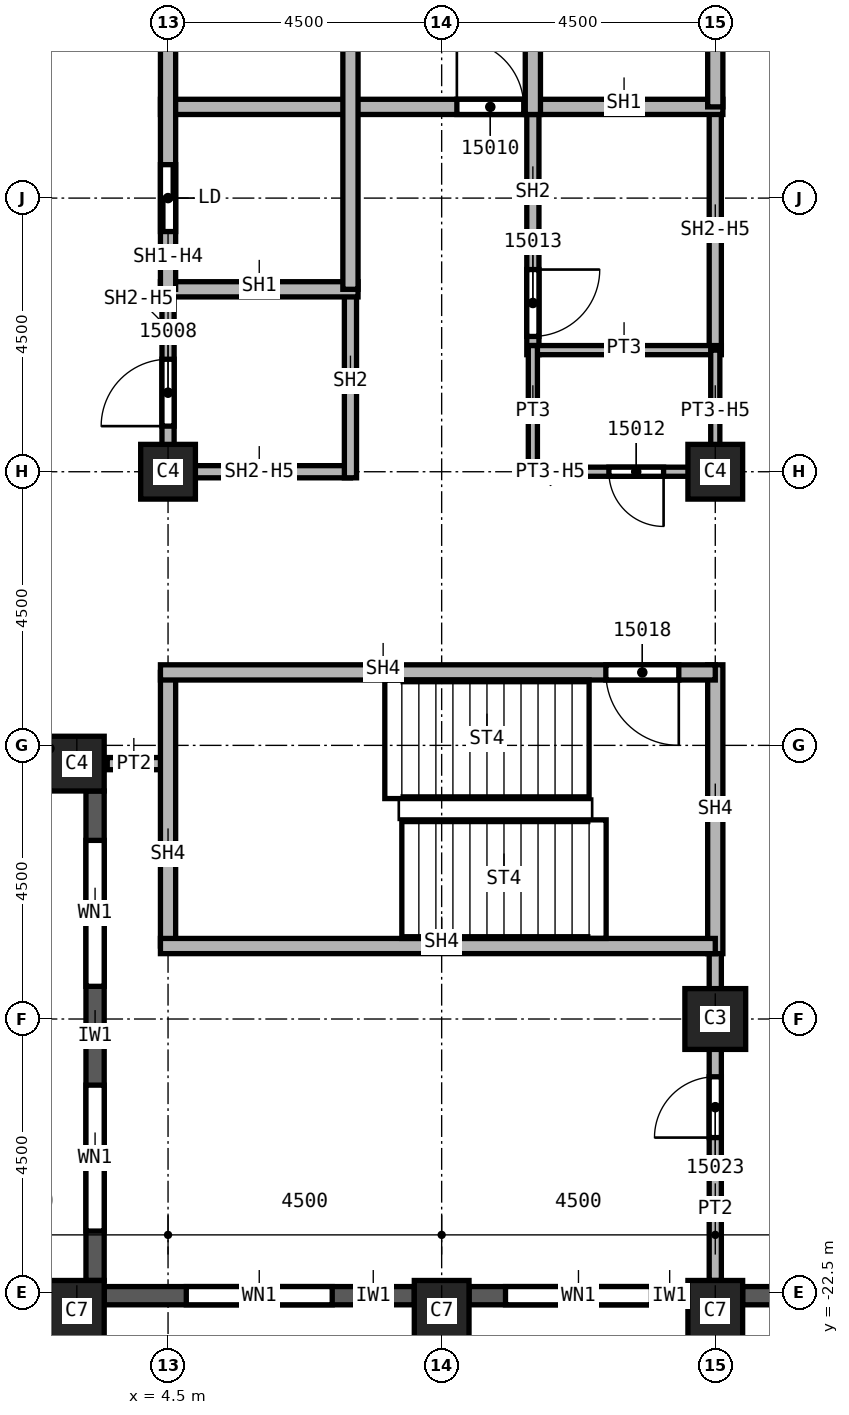
"""IFC4 building model, lengths in metres.
Left out: names, types, materials, properties, quantities, classifications, styles, units other than length and angle.
Written with IfcOpenShell. Run it as: python <this file> out.ifc"""

import sys

from ifc_helpers import new_model, si_unit, direction, frame, frame_2d, origin, origin_2d, place, context, subcontext, project, spatial, rectangle, extrude, element, fill, save


model = new_model("IFC4")
c1 = context("Model", 3, precision=1e-05, world=origin(), true_north=direction((0.0, 1.0)))
c2 = subcontext(c1, "Body", "Model", "MODEL_VIEW")
j1 = project(units=[si_unit("LENGTHUNIT", "METRE"), si_unit("PLANEANGLEUNIT", "RADIAN")], contexts=[c1])
p1 = place(None, origin())
s1 = spatial("IfcSite", under=j1, at=p1, CompositionType="ELEMENT")
p2 = place(p1, origin())
s2 = spatial("IfcBuilding", under=s1, at=p2, CompositionType="ELEMENT")
p3 = place(p2, frame((0.0, 0.0, 232.0)))
s3 = spatial("IfcBuildingStorey", under=s2, at=p3, CompositionType="ELEMENT", Elevation=232.0)
p4 = place(p3, frame((13.5, -18.0, 0.0), z_axis=(0.0, 0.0, 1.0), x_axis=(1.0, 0.0, 0.0)))
e1 = element("IfcColumn", 1, at=p4, inside=s3, PredefinedType="COLUMN", context=c2, shape_type="SweptSolid", body=[
    extrude(rectangle(XDim=1.0, YDim=1.0, at=origin_2d()), origin(), (0.0, 0.0, 1.0), 3.6),
])
for number, where, z_axis, x_axis in (
    (2, (4.5, -9.0, 0.0), (0.0, 0.0, 1.0), (1.0, 0.0, 0.0)),
    (3, (13.5, -9.0, 0.0), (0.0, 0.0, 1.0), (1.0, 0.0, 0.0)),
):
    element("IfcColumn", number, at=place(p3, frame(where, z_axis=z_axis, x_axis=x_axis)), inside=s3, PredefinedType="COLUMN", context=c2, shape_type="SweptSolid", body=[
        extrude(rectangle(XDim=0.9, YDim=0.9, at=origin_2d()), origin(), (0.0, 0.0, 1.0), 3.6),
    ])
for number, where, z_axis, x_axis in (
    (4, (3.0, -22.8, 0.0), (0.0, 0.0, 1.0), (1.0, 0.0, 0.0)),
    (5, (9.0, -22.8, 0.0), (0.0, 0.0, 1.0), (1.0, 0.0, 0.0)),
    (6, (13.5, -22.8, 0.0), (0.0, 0.0, 1.0), (1.0, 0.0, 0.0)),
):
    element("IfcColumn", number, at=place(p3, frame(where, z_axis=z_axis, x_axis=x_axis)), inside=s3, PredefinedType="COLUMN", context=c2, shape_type="SweptSolid", body=[
        extrude(rectangle(XDim=0.9, YDim=1.0, at=origin_2d()), origin(), (0.0, 0.0, 1.0), 3.6),
    ])
p5 = place(p3, frame((3.0, -13.8, 0.0), z_axis=(0.0, 0.0, 1.0), x_axis=(1.0, 0.0, 0.0)))
e7 = element("IfcColumn", 7, at=p5, inside=s3, PredefinedType="COLUMN", context=c2, shape_type="SweptSolid", body=[
    extrude(rectangle(XDim=0.9, YDim=0.9, at=origin_2d()), origin(), (0.0, 0.0, 1.0), 3.6),
])
p6 = place(p3, frame((3.3, -14.25, 0.0), z_axis=(0.0, 0.0, 1.0), x_axis=(0.0, -1.0, 0.0)))
e8 = element("IfcWall", 8, at=p6, inside=s3, PredefinedType="SOLIDWALL", context=c2, shape_type="SweptSolid", body=[
    extrude(rectangle(XDim=8.05, YDim=0.3, at=frame_2d((4.025, 0.0))), origin(), (0.0, 0.0, 1.0), 3.0),
])
p7 = place(p6, frame((0.812, 0.0, 0.8)))
e9 = element("IfcOpeningElement", 9, at=p7, cuts=e8, PredefinedType="OPENING", context=c2, shape_type="SweptSolid", body=[
    extrude(rectangle(XDim=2.4, YDim=1.95, at=frame_2d((1.2, 0.975))), frame((0.0, 0.15, 0.0), z_axis=(0.0, -1.0, 0.0), x_axis=(1.0, 0.0, 0.0)), (0.0, 0.0, 1.0), 0.3),
])
p8 = place(p6, frame((4.837, 0.0, 0.8)))
e10 = element("IfcOpeningElement", 10, at=p8, cuts=e8, PredefinedType="OPENING", context=c2, shape_type="SweptSolid", body=[
    extrude(rectangle(XDim=2.4, YDim=1.95, at=frame_2d((1.2, 0.975))), frame((0.0, 0.15, 0.0), z_axis=(0.0, -1.0, 0.0), x_axis=(1.0, 0.0, 0.0)), (0.0, 0.0, 1.0), 0.3),
])
p9 = place(p3, frame((3.45, -22.55, 0.0), z_axis=(0.0, 0.0, 1.0), x_axis=(1.0, 0.0, 0.0)))
e11 = element("IfcWall", 11, at=p9, inside=s3, PredefinedType="SOLIDWALL", context=c2, shape_type="SweptSolid", body=[
    extrude(rectangle(XDim=5.1, YDim=0.3, at=frame_2d((2.55, 0.0))), origin(), (0.0, 0.0, 1.0), 3.0),
])
p10 = place(p9, frame((1.35, 0.0, 0.8)))
e12 = element("IfcOpeningElement", 12, at=p10, cuts=e11, PredefinedType="OPENING", context=c2, shape_type="SweptSolid", body=[
    extrude(rectangle(XDim=2.4, YDim=1.95, at=frame_2d((1.2, 0.975))), frame((0.0, 0.15, 0.0), z_axis=(0.0, -1.0, 0.0), x_axis=(1.0, 0.0, 0.0)), (0.0, 0.0, 1.0), 0.3),
])
p11 = place(p3, frame((9.45, -22.55, 0.0), z_axis=(0.0, 0.0, 1.0), x_axis=(1.0, 0.0, 0.0)))
e13 = element("IfcWall", 13, at=p11, inside=s3, PredefinedType="SOLIDWALL", context=c2, shape_type="SweptSolid", body=[
    extrude(rectangle(XDim=3.6, YDim=0.3, at=frame_2d((1.8, 0.0))), origin(), (0.0, 0.0, 1.0), 3.0),
])
p12 = place(p11, frame((0.6, 0.0, 0.8)))
e14 = element("IfcOpeningElement", 14, at=p12, cuts=e13, PredefinedType="OPENING", context=c2, shape_type="SweptSolid", body=[
    extrude(rectangle(XDim=2.4, YDim=1.95, at=frame_2d((1.2, 0.975))), frame((0.0, 0.15, 0.0), z_axis=(0.0, -1.0, 0.0), x_axis=(1.0, 0.0, 0.0)), (0.0, 0.0, 1.0), 0.3),
])
p13 = place(p3, frame((13.95, -22.55, 0.0), z_axis=(0.0, 0.0, 1.0), x_axis=(1.0, 0.0, 0.0)))
e15 = element("IfcWall", 15, at=p13, inside=s3, PredefinedType="SOLIDWALL", context=c2, shape_type="SweptSolid", body=[
    extrude(rectangle(XDim=3.6, YDim=0.3, at=frame_2d((1.8, 0.0))), origin(), (0.0, 0.0, 1.0), 3.0),
])
p14 = place(p13, frame((0.625, 0.0, 0.8)))
e16 = element("IfcOpeningElement", 16, at=p14, cuts=e15, PredefinedType="OPENING", context=c2, shape_type="SweptSolid", body=[
    extrude(rectangle(XDim=0.6, YDim=1.95, at=frame_2d((0.3, 0.975))), frame((0.0, 0.15, 0.0), z_axis=(0.0, -1.0, 0.0), x_axis=(1.0, 0.0, 0.0)), (0.0, 0.0, 1.0), 0.3),
])
p15 = place(p13, frame((1.825, 0.0, 0.8)))
e17 = element("IfcOpeningElement", 17, at=p15, cuts=e15, PredefinedType="OPENING", context=c2, shape_type="SweptSolid", body=[
    extrude(rectangle(XDim=1.0, YDim=1.95, at=frame_2d((0.5, 0.975))), frame((0.0, 0.15, 0.0), z_axis=(0.0, -1.0, 0.0), x_axis=(1.0, 0.0, 0.0)), (0.0, 0.0, 1.0), 0.3),
])
p16 = place(p3, frame((4.5, -13.8, 0.0), z_axis=(0.0, 0.0, 1.0), x_axis=(-1.0, 0.0, 0.0)))
e18 = element("IfcWall", 18, at=p16, inside=s3, PredefinedType="PARTITIONING", context=c2, shape_type="SweptSolid", body=[
    extrude(rectangle(XDim=1.0, YDim=0.2, at=frame_2d((0.5, 0.0))), origin(), (0.0, 0.0, 1.0), 3.6),
])
p17 = place(p3, frame((13.5, -22.3, 0.0), z_axis=(0.0, 0.0, 1.0), x_axis=(0.0, 1.0, 0.0)))
e19 = element("IfcWall", 19, at=p17, inside=s3, PredefinedType="PARTITIONING", context=c2, shape_type="SweptSolid", body=[
    extrude(rectangle(XDim=5.625, YDim=0.2, at=frame_2d((2.812, 0.0))), origin(), (0.0, 0.0, 1.0), 3.6),
])
p18 = place(p17, frame((2.35, 0.0, 0.0)))
e20 = element("IfcOpeningElement", 20, at=p18, cuts=e19, PredefinedType="OPENING", context=c2, shape_type="SweptSolid", body=[
    extrude(rectangle(XDim=1.0, YDim=2.1, at=frame_2d((0.5, 1.05))), frame((0.0, 0.1, 0.0), z_axis=(0.0, -1.0, 0.0), x_axis=(1.0, 0.0, 0.0)), (0.0, 0.0, 1.0), 0.2),
])
p19 = place(p3, frame((4.5, -9.1, 0.0), z_axis=(0.0, 0.0, 1.0), x_axis=(0.0, 1.0, 0.0)))
e21 = element("IfcWall", 21, at=p19, inside=s3, PredefinedType="SOLIDWALL", context=c2, shape_type="SweptSolid", body=[
    extrude(rectangle(XDim=3.1, YDim=0.2, at=frame_2d((1.55, 0.0))), origin(), (0.0, 0.0, 1.0), 2.838),
])
p20 = place(p19, frame((0.85, 0.0, 0.0)))
e22 = element("IfcOpeningElement", 22, at=p20, cuts=e21, PredefinedType="OPENING", context=c2, shape_type="SweptSolid", body=[
    extrude(rectangle(XDim=1.1, YDim=2.1, at=frame_2d((0.55, 1.05))), frame((0.0, 0.1, 0.0), z_axis=(0.0, -1.0, 0.0), x_axis=(1.0, 0.0, 0.0)), (0.0, 0.0, 1.0), 0.2),
])
p21 = place(p3, frame((7.5, -9.0, 0.0), z_axis=(0.0, 0.0, 1.0), x_axis=(-1.0, 0.0, 0.0)))
e23 = element("IfcWall", 23, at=p21, inside=s3, PredefinedType="SOLIDWALL", context=c2, shape_type="SweptSolid", body=[
    extrude(rectangle(XDim=3.0, YDim=0.2, at=frame_2d((1.5, 0.0))), origin(), (0.0, 0.0, 1.0), 2.838),
])
p22 = place(p3, frame((7.5, -6.0, 0.0), z_axis=(0.0, 0.0, 1.0), x_axis=(0.0, -1.0, 0.0)))
e24 = element("IfcWall", 24, at=p22, inside=s3, PredefinedType="SOLIDWALL", context=c2, shape_type="SweptSolid", body=[
    extrude(rectangle(XDim=3.1, YDim=0.2, at=frame_2d((1.55, 0.0))), origin(), (0.0, 0.0, 1.0), 3.6),
])
p23 = place(p3, frame((10.5, -2.875, 0.0), z_axis=(0.0, 0.0, 1.0), x_axis=(0.0, -1.0, 0.0)))
e25 = element("IfcWall", 25, at=p23, inside=s3, PredefinedType="SOLIDWALL", context=c2, shape_type="SweptSolid", body=[
    extrude(rectangle(XDim=4.2, YDim=0.2, at=frame_2d((2.1, 0.0))), origin(), (0.0, 0.0, 1.0), 3.6),
])
p24 = place(p23, frame((2.8, 0.0, 0.0)))
e26 = element("IfcOpeningElement", 26, at=p24, cuts=e25, PredefinedType="OPENING", context=c2, shape_type="SweptSolid", body=[
    extrude(rectangle(XDim=1.1, YDim=2.1, at=frame_2d((0.55, 1.05))), frame((0.0, 0.1, 0.0), z_axis=(0.0, -1.0, 0.0), x_axis=(1.0, 0.0, 0.0)), (0.0, 0.0, 1.0), 0.2),
])
p25 = place(p3, frame((13.5, -3.0, 0.0), z_axis=(0.0, 0.0, 1.0), x_axis=(0.0, -1.0, 0.0)))
e27 = element("IfcWall", 27, at=p25, inside=s3, PredefinedType="SOLIDWALL", context=c2, shape_type="SweptSolid", body=[
    extrude(rectangle(XDim=4.0, YDim=0.2, at=frame_2d((2.0, 0.0))), origin(), (0.0, 0.0, 1.0), 2.838),
])
p26 = place(p3, frame((4.375, -6.0, 0.0), z_axis=(0.0, 0.0, 1.0), x_axis=(1.0, 0.0, 0.0)))
e28 = element("IfcWall", 28, at=p26, inside=s3, PredefinedType="SOLIDWALL", context=c2, shape_type="SweptSolid", body=[
    extrude(rectangle(XDim=3.25, YDim=0.25, at=frame_2d((1.625, 0.0))), origin(), (0.0, 0.0, 1.0), 3.6),
])
p27 = place(p3, frame((4.375, -3.0, 0.0), z_axis=(0.0, 0.0, 1.0), x_axis=(1.0, 0.0, 0.0)))
e29 = element("IfcWall", 29, at=p27, inside=s3, PredefinedType="SOLIDWALL", context=c2, shape_type="SweptSolid", body=[
    extrude(rectangle(XDim=9.25, YDim=0.25, at=frame_2d((4.625, 0.0))), origin(), (0.0, 0.0, 1.0), 3.6),
])
p28 = place(p27, frame((4.875, 0.0, 0.0)))
e30 = element("IfcOpeningElement", 30, at=p28, cuts=e29, PredefinedType="OPENING", context=c2, shape_type="SweptSolid", body=[
    extrude(rectangle(XDim=1.1, YDim=2.1, at=frame_2d((0.55, 1.05))), frame((0.0, 0.125, 0.0), z_axis=(0.0, -1.0, 0.0), x_axis=(1.0, 0.0, 0.0)), (0.0, 0.0, 1.0), 0.25),
])
p29 = place(p3, frame((4.5, -6.0, 0.0), z_axis=(0.0, 0.0, 1.0), x_axis=(0.0, 1.0, 0.0)))
e31 = element("IfcWall", 31, at=p29, inside=s3, PredefinedType="SOLIDWALL", context=c2, shape_type="SweptSolid", body=[
    extrude(rectangle(XDim=6.0, YDim=0.25, at=frame_2d((3.0, 0.0))), origin(), (0.0, 0.0, 1.0), 2.838),
])
p30 = place(p29, frame((0.95, 0.0, 0.0)))
e32 = element("IfcOpeningElement", 32, at=p30, cuts=e31, PredefinedType="OPENING", context=c2, shape_type="SweptSolid", body=[
    extrude(rectangle(XDim=1.1, YDim=2.1, at=frame_2d((0.55, 1.05))), frame((0.0, 0.125, 0.0), z_axis=(0.0, -1.0, 0.0), x_axis=(1.0, 0.0, 0.0)), (0.0, 0.0, 1.0), 0.25),
])
p31 = place(p29, frame((3.95, 0.0, 0.0)))
e33 = element("IfcOpeningElement", 33, at=p31, cuts=e31, PredefinedType="OPENING", context=c2, shape_type="SweptSolid", body=[
    extrude(rectangle(XDim=1.1, YDim=2.1, at=frame_2d((0.55, 1.05))), frame((0.0, 0.125, 0.0), z_axis=(0.0, -1.0, 0.0), x_axis=(1.0, 0.0, 0.0)), (0.0, 0.0, 1.0), 0.25),
])
p32 = place(p3, frame((7.5, 3.125, 0.0), z_axis=(0.0, 0.0, 1.0), x_axis=(0.0, -1.0, 0.0)))
e34 = element("IfcWall", 34, at=p32, inside=s3, PredefinedType="SOLIDWALL", context=c2, shape_type="SweptSolid", body=[
    extrude(rectangle(XDim=9.125, YDim=0.25, at=frame_2d((4.562, 0.0))), origin(), (0.0, 0.0, 1.0), 3.6),
])
p33 = place(p3, frame((10.5, 6.125, 0.0), z_axis=(0.0, 0.0, 1.0), x_axis=(0.0, -1.0, 0.0)))
e35 = element("IfcWall", 35, at=p33, inside=s3, PredefinedType="SOLIDWALL", context=c2, shape_type="SweptSolid", body=[
    extrude(rectangle(XDim=9.25, YDim=0.25, at=frame_2d((4.625, 0.0))), origin(), (0.0, 0.0, 1.0), 3.6),
])
p34 = place(p33, frame((7.075, 0.0, 0.0)))
e36 = element("IfcOpeningElement", 36, at=p34, cuts=e35, PredefinedType="OPENING", context=c2, shape_type="SweptSolid", body=[
    extrude(rectangle(XDim=1.1, YDim=2.1, at=frame_2d((0.55, 1.05))), frame((0.0, 0.125, 0.0), z_axis=(0.0, -1.0, 0.0), x_axis=(1.0, 0.0, 0.0)), (0.0, 0.0, 1.0), 0.25),
])
p35 = place(p33, frame((4.075, 0.0, 0.0)))
e37 = element("IfcOpeningElement", 37, at=p35, cuts=e35, PredefinedType="OPENING", context=c2, shape_type="SweptSolid", body=[
    extrude(rectangle(XDim=1.1, YDim=2.1, at=frame_2d((0.55, 1.05))), frame((0.0, 0.125, 0.0), z_axis=(0.0, -1.0, 0.0), x_axis=(1.0, 0.0, 0.0)), (0.0, 0.0, 1.0), 0.25),
])
p36 = place(p3, frame((13.5, 6.0, 0.0), z_axis=(0.0, 0.0, 1.0), x_axis=(0.0, -1.0, 0.0)))
e38 = element("IfcWall", 38, at=p36, inside=s3, PredefinedType="SOLIDWALL", context=c2, shape_type="SweptSolid", body=[
    extrude(rectangle(XDim=9.0, YDim=0.25, at=frame_2d((4.5, 0.0))), origin(), (0.0, 0.0, 1.0), 2.838),
])
p37 = place(p3, frame((4.5, -16.8, 0.0), z_axis=(0.0, 0.0, 1.0), x_axis=(0.0, 1.0, 0.0)))
e39 = element("IfcWall", 39, at=p37, inside=s3, PredefinedType="SOLIDWALL", context=c2, shape_type="SweptSolid", body=[
    extrude(rectangle(XDim=4.5, YDim=0.25, at=frame_2d((2.25, 0.0))), origin(), (0.0, 0.0, 1.0), 3.6),
])
p38 = place(p3, frame((13.5, -16.925, 0.0), z_axis=(0.0, 0.0, 1.0), x_axis=(0.0, 1.0, 0.0)))
e40 = element("IfcWall", 40, at=p38, inside=s3, PredefinedType="SOLIDWALL", context=c2, shape_type="SweptSolid", body=[
    extrude(rectangle(XDim=4.75, YDim=0.25, at=frame_2d((2.375, 0.0))), origin(), (0.0, 0.0, 1.0), 3.6),
])
p39 = place(p3, frame((13.5, -16.8, 0.0), z_axis=(0.0, 0.0, 1.0), x_axis=(-1.0, 0.0, 0.0)))
e41 = element("IfcWall", 41, at=p39, inside=s3, PredefinedType="SOLIDWALL", context=c2, shape_type="SweptSolid", body=[
    extrude(rectangle(XDim=9.125, YDim=0.25, at=frame_2d((4.562, 0.0))), origin(), (0.0, 0.0, 1.0), 3.6),
])
p40 = place(p3, frame((13.5, -12.3, 0.0), z_axis=(0.0, 0.0, 1.0), x_axis=(-1.0, 0.0, 0.0)))
e42 = element("IfcWall", 42, at=p40, inside=s3, PredefinedType="SOLIDWALL", context=c2, shape_type="SweptSolid", body=[
    extrude(rectangle(XDim=9.125, YDim=0.25, at=frame_2d((4.562, 0.0))), origin(), (0.0, 0.0, 1.0), 3.6),
])
p41 = place(p40, frame((0.6, 0.0, 0.0)))
e43 = element("IfcOpeningElement", 43, at=p41, cuts=e42, PredefinedType="OPENING", context=c2, shape_type="SweptSolid", body=[
    extrude(rectangle(XDim=1.2, YDim=2.1, at=frame_2d((0.6, 1.05))), frame((0.0, 0.125, 0.0), z_axis=(0.0, -1.0, 0.0), x_axis=(1.0, 0.0, 0.0)), (0.0, 0.0, 1.0), 0.25),
])
p42 = place(p3, frame((10.5, -7.0, 0.0), z_axis=(0.0, 0.0, 1.0), x_axis=(1.0, 0.0, 0.0)))
e44 = element("IfcWall", 44, at=p42, inside=s3, PredefinedType="PARTITIONING", context=c2, shape_type="SweptSolid", body=[
    extrude(rectangle(XDim=3.1, YDim=0.15, at=frame_2d((1.55, 0.0))), origin(), (0.0, 0.0, 1.0), 3.6),
])
p43 = place(p3, frame((10.5, -6.925, 0.0), z_axis=(0.0, 0.0, 1.0), x_axis=(0.0, -1.0, 0.0)))
e45 = element("IfcWall", 45, at=p43, inside=s3, PredefinedType="PARTITIONING", context=c2, shape_type="SweptSolid", body=[
    extrude(rectangle(XDim=2.15, YDim=0.15, at=frame_2d((1.075, 0.0))), origin(), (0.0, 0.0, 1.0), 3.6),
])
p44 = place(p3, frame((13.5, -9.0, 0.0), z_axis=(0.0, 0.0, 1.0), x_axis=(-1.0, 0.0, 0.0)))
e46 = element("IfcWall", 46, at=p44, inside=s3, PredefinedType="PARTITIONING", context=c2, shape_type="SweptSolid", body=[
    extrude(rectangle(XDim=3.0, YDim=0.15, at=frame_2d((1.5, 0.0))), origin(), (0.0, 0.0, 1.0), 2.838),
])
p45 = place(p44, frame((0.85, 0.0, 0.0)))
e47 = element("IfcOpeningElement", 47, at=p45, cuts=e46, PredefinedType="OPENING", context=c2, shape_type="SweptSolid", body=[
    extrude(rectangle(XDim=0.9, YDim=2.1, at=frame_2d((0.45, 1.05))), frame((0.0, 0.075, 0.0), z_axis=(0.0, -1.0, 0.0), x_axis=(1.0, 0.0, 0.0)), (0.0, 0.0, 1.0), 0.15),
])
p46 = place(p3, frame((13.5, -7.0, 0.0), z_axis=(0.0, 0.0, 1.0), x_axis=(0.0, -1.0, 0.0)))
e48 = element("IfcWall", 48, at=p46, inside=s3, PredefinedType="PARTITIONING", context=c2, shape_type="SweptSolid", body=[
    extrude(rectangle(XDim=2.075, YDim=0.15, at=frame_2d((1.038, 0.0))), origin(), (0.0, 0.0, 1.0), 2.838),
])
p47 = place(p7, origin())
e49 = element("IfcWindow", 49, at=p47, inside=s3, PartitioningType="SINGLE_PANEL", PredefinedType="WINDOW", context=c2, shape_type="SweptSolid", body=[
    extrude(rectangle(XDim=2.4, YDim=1.95, at=frame_2d((1.2, 0.975))), frame((0.0, 0.03, 0.0), z_axis=(0.0, -1.0, 0.0), x_axis=(1.0, 0.0, 0.0)), (0.0, 0.0, 1.0), 0.06),
])
fill(e9, e49)
p48 = place(p8, origin())
e50 = element("IfcWindow", 50, at=p48, inside=s3, PartitioningType="SINGLE_PANEL", PredefinedType="WINDOW", context=c2, shape_type="SweptSolid", body=[
    extrude(rectangle(XDim=2.4, YDim=1.95, at=frame_2d((1.2, 0.975))), frame((0.0, 0.03, 0.0), z_axis=(0.0, -1.0, 0.0), x_axis=(1.0, 0.0, 0.0)), (0.0, 0.0, 1.0), 0.06),
])
fill(e10, e50)
p49 = place(p10, origin())
e51 = element("IfcWindow", 51, at=p49, inside=s3, PartitioningType="SINGLE_PANEL", PredefinedType="WINDOW", context=c2, shape_type="SweptSolid", body=[
    extrude(rectangle(XDim=2.4, YDim=1.95, at=frame_2d((1.2, 0.975))), frame((0.0, 0.03, 0.0), z_axis=(0.0, -1.0, 0.0), x_axis=(1.0, 0.0, 0.0)), (0.0, 0.0, 1.0), 0.06),
])
fill(e12, e51)
p50 = place(p12, origin())
e52 = element("IfcWindow", 52, at=p50, inside=s3, PartitioningType="SINGLE_PANEL", PredefinedType="WINDOW", context=c2, shape_type="SweptSolid", body=[
    extrude(rectangle(XDim=2.4, YDim=1.95, at=frame_2d((1.2, 0.975))), frame((0.0, 0.03, 0.0), z_axis=(0.0, -1.0, 0.0), x_axis=(1.0, 0.0, 0.0)), (0.0, 0.0, 1.0), 0.06),
])
fill(e14, e52)
p51 = place(p20, origin())
e53 = element("IfcDoor", 53, at=p51, inside=s3, OperationType="SINGLE_SWING_LEFT", PredefinedType="DOOR", context=c2, shape_type="SweptSolid", body=[
    extrude(rectangle(XDim=1.1, YDim=2.1, at=frame_2d((0.55, 1.05))), frame((0.0, 0.025, 0.0), z_axis=(0.0, -1.0, 0.0), x_axis=(1.0, 0.0, 0.0)), (0.0, 0.0, 1.0), 0.05),
])
fill(e22, e53)
p52 = place(p28, origin())
e54 = element("IfcDoor", 54, at=p52, inside=s3, OperationType="SINGLE_SWING_LEFT", PredefinedType="DOOR", context=c2, shape_type="SweptSolid", body=[
    extrude(rectangle(XDim=1.1, YDim=2.1, at=frame_2d((0.55, 1.05))), frame((0.0, 0.025, 0.0), z_axis=(0.0, -1.0, 0.0), x_axis=(1.0, 0.0, 0.0)), (0.0, 0.0, 1.0), 0.05),
])
fill(e30, e54)
p53 = place(p45, origin())
e55 = element("IfcDoor", 55, at=p53, inside=s3, OperationType="SINGLE_SWING_LEFT", PredefinedType="DOOR", context=c2, shape_type="SweptSolid", body=[
    extrude(rectangle(XDim=0.9, YDim=2.1, at=frame_2d((0.45, 1.05))), frame((0.0, 0.025, 0.0), z_axis=(0.0, -1.0, 0.0), x_axis=(1.0, 0.0, 0.0)), (0.0, 0.0, 1.0), 0.05),
])
fill(e47, e55)
p54 = place(p24, origin())
e56 = element("IfcDoor", 56, at=p54, inside=s3, OperationType="SINGLE_SWING_RIGHT", PredefinedType="DOOR", context=c2, shape_type="SweptSolid", body=[
    extrude(rectangle(XDim=1.1, YDim=2.1, at=frame_2d((0.55, 1.05))), frame((0.0, 0.025, 0.0), z_axis=(0.0, -1.0, 0.0), x_axis=(1.0, 0.0, 0.0)), (0.0, 0.0, 1.0), 0.05),
])
fill(e26, e56)
p55 = place(p41, origin())
e57 = element("IfcDoor", 57, at=p55, inside=s3, OperationType="SINGLE_SWING_LEFT", PredefinedType="DOOR", context=c2, shape_type="SweptSolid", body=[
    extrude(rectangle(XDim=1.2, YDim=2.1, at=frame_2d((0.6, 1.05))), frame((0.0, 0.025, 0.0), z_axis=(0.0, -1.0, 0.0), x_axis=(1.0, 0.0, 0.0)), (0.0, 0.0, 1.0), 0.05),
])
fill(e43, e57)
p56 = place(p18, origin())
e58 = element("IfcDoor", 58, at=p56, inside=s3, OperationType="SINGLE_SWING_RIGHT", PredefinedType="DOOR", context=c2, shape_type="SweptSolid", body=[
    extrude(rectangle(XDim=1.0, YDim=2.1, at=frame_2d((0.5, 1.05))), frame((0.0, 0.025, 0.0), z_axis=(0.0, -1.0, 0.0), x_axis=(1.0, 0.0, 0.0)), (0.0, 0.0, 1.0), 0.05),
])
fill(e20, e58)
p57 = place(p30, origin())
e59 = element("IfcDoor", 59, at=p57, inside=s3, OperationType="SLIDING_TO_LEFT", PredefinedType="DOOR", context=c2, shape_type="SweptSolid", body=[
    extrude(rectangle(XDim=1.1, YDim=2.1, at=frame_2d((0.55, 1.05))), frame((0.0, 0.025, 0.0), z_axis=(0.0, -1.0, 0.0), x_axis=(1.0, 0.0, 0.0)), (0.0, 0.0, 1.0), 0.05),
])
fill(e32, e59)
save(model, sys.argv[1])
